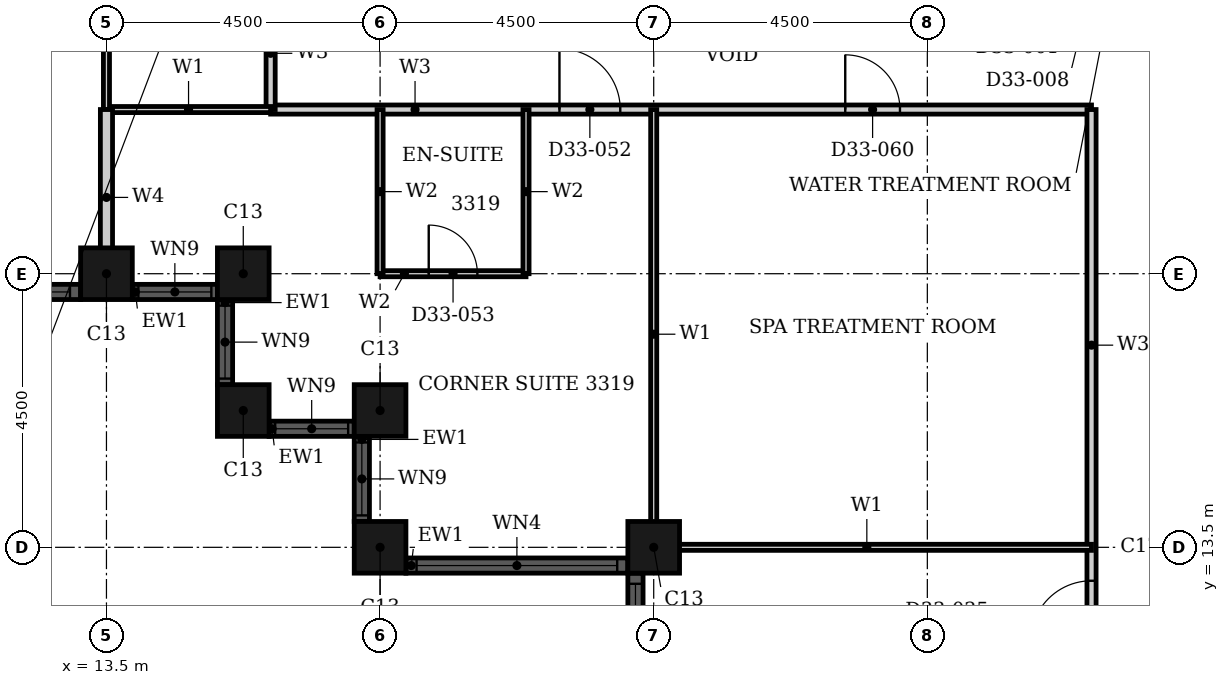
"""IFC4 building model, lengths in metres.
Left out: names, types, materials, properties, quantities, classifications, styles, units other than length and angle.
Written with IfcOpenShell. Run it as: python <this file> out.ifc"""

import sys

from ifc_helpers import new_model, si_unit, direction, frame, frame_2d, origin, origin_2d, place, context, subcontext, project, spatial, rectangle, hollow_rectangle, extrude, element, fill, save


model = new_model("IFC4")
c1 = context("Model", 3, precision=1e-05, world=origin(), true_north=direction((0.0, 1.0)))
c2 = subcontext(c1, "Body", "Model", "MODEL_VIEW")
j1 = project(units=[si_unit("LENGTHUNIT", "METRE"), si_unit("PLANEANGLEUNIT", "RADIAN")], contexts=[c1])
p1 = place(None, origin())
s1 = spatial("IfcSite", under=j1, at=p1, CompositionType="ELEMENT")
p2 = place(p1, origin())
s2 = spatial("IfcBuilding", under=s1, at=p2, CompositionType="ELEMENT")
p3 = place(p2, frame((0.0, 0.0, 133.2)))
s3 = spatial("IfcBuildingStorey", under=s2, at=p3, CompositionType="ELEMENT", Elevation=133.2)
for number, where, z_axis, x_axis in (
    (1, (13.5, 18.0, 0.0), (0.0, 0.0, 1.0), (1.0, 0.0, 0.0)),
    (2, (15.75, 18.0, 0.0), (0.0, 0.0, 1.0), (1.0, 0.0, 0.0)),
    (3, (15.75, 15.75, 0.0), (0.0, 0.0, 1.0), (1.0, 0.0, 0.0)),
    (4, (18.0, 15.75, 0.0), (0.0, 0.0, 1.0), (1.0, 0.0, 0.0)),
    (5, (18.0, 13.5, 0.0), (0.0, 0.0, 1.0), (1.0, 0.0, 0.0)),
    (6, (22.5, 13.5, 0.0), (0.0, 0.0, 1.0), (1.0, 0.0, 0.0)),
):
    element("IfcColumn", number, at=place(p3, frame(where, z_axis=z_axis, x_axis=x_axis)), inside=s3, PredefinedType="COLUMN", context=c2, shape_type="SweptSolid", body=[
        extrude(hollow_rectangle(XDim=0.85, YDim=0.85, WallThickness=0.026, at=origin_2d()), origin(), (0.0, 0.0, 1.0), 3.6),
    ])
p4 = place(p3, frame((4.925, 17.7, 0.0), z_axis=(0.0, 0.0, 1.0), x_axis=(1.0, 0.0, 0.0)))
e7 = element("IfcWall", 7, at=p4, inside=s3, PredefinedType="SOLIDWALL", context=c2, shape_type="SweptSolid", body=[
    extrude(rectangle(XDim=8.15, YDim=0.25, at=frame_2d((4.075, 0.0))), origin(), (0.0, 0.0, 1.0), 3.6),
])
p5 = place(p4, frame((0.175, 0.0, 0.9)))
e8 = element("IfcOpeningElement", 8, at=p5, cuts=e7, PredefinedType="OPENING", context=c2, shape_type="SweptSolid", body=[
    extrude(rectangle(XDim=3.3, YDim=2.08, at=frame_2d((1.65, 1.04))), frame((0.0, 0.135, 0.0), z_axis=(0.0, -1.0, 0.0), x_axis=(1.0, 0.0, 0.0)), (0.0, 0.0, 1.0), 0.27),
])
p6 = place(p4, frame((4.675, 0.0, 0.9)))
e9 = element("IfcOpeningElement", 9, at=p6, cuts=e7, PredefinedType="OPENING", context=c2, shape_type="SweptSolid", body=[
    extrude(rectangle(XDim=3.3, YDim=2.08, at=frame_2d((1.65, 1.04))), frame((0.0, 0.135, 0.0), z_axis=(0.0, -1.0, 0.0), x_axis=(1.0, 0.0, 0.0)), (0.0, 0.0, 1.0), 0.27),
])
p7 = place(p3, frame((13.925, 17.7, 0.0), z_axis=(0.0, 0.0, 1.0), x_axis=(1.0, 0.0, 0.0)))
e10 = element("IfcWall", 10, at=p7, inside=s3, PredefinedType="SOLIDWALL", context=c2, shape_type="SweptSolid", body=[
    extrude(rectangle(XDim=1.4, YDim=0.25, at=frame_2d((0.7, 0.0))), origin(), (0.0, 0.0, 1.0), 3.6),
])
p8 = place(p7, frame((0.1, 0.0, 0.9)))
e11 = element("IfcOpeningElement", 11, at=p8, cuts=e10, PredefinedType="OPENING", context=c2, shape_type="SweptSolid", body=[
    extrude(rectangle(XDim=1.2, YDim=2.08, at=frame_2d((0.6, 1.04))), frame((0.0, 0.135, 0.0), z_axis=(0.0, -1.0, 0.0), x_axis=(1.0, 0.0, 0.0)), (0.0, 0.0, 1.0), 0.27),
])
p9 = place(p3, frame((15.45, 17.575, 0.0), z_axis=(0.0, 0.0, 1.0), x_axis=(0.0, -1.0, 0.0)))
e12 = element("IfcWall", 12, at=p9, inside=s3, PredefinedType="SOLIDWALL", context=c2, shape_type="SweptSolid", body=[
    extrude(rectangle(XDim=1.4, YDim=0.25, at=frame_2d((0.7, 0.0))), origin(), (0.0, 0.0, 1.0), 3.6),
])
p10 = place(p9, frame((0.1, 0.0, 0.9)))
e13 = element("IfcOpeningElement", 13, at=p10, cuts=e12, PredefinedType="OPENING", context=c2, shape_type="SweptSolid", body=[
    extrude(rectangle(XDim=1.2, YDim=2.08, at=frame_2d((0.6, 1.04))), frame((0.0, 0.135, 0.0), z_axis=(0.0, -1.0, 0.0), x_axis=(1.0, 0.0, 0.0)), (0.0, 0.0, 1.0), 0.27),
])
p11 = place(p3, frame((16.175, 15.45, 0.0), z_axis=(0.0, 0.0, 1.0), x_axis=(1.0, 0.0, 0.0)))
e14 = element("IfcWall", 14, at=p11, inside=s3, PredefinedType="SOLIDWALL", context=c2, shape_type="SweptSolid", body=[
    extrude(rectangle(XDim=1.4, YDim=0.25, at=frame_2d((0.7, 0.0))), origin(), (0.0, 0.0, 1.0), 3.6),
])
p12 = place(p11, frame((0.1, 0.0, 0.9)))
e15 = element("IfcOpeningElement", 15, at=p12, cuts=e14, PredefinedType="OPENING", context=c2, shape_type="SweptSolid", body=[
    extrude(rectangle(XDim=1.2, YDim=2.08, at=frame_2d((0.6, 1.04))), frame((0.0, 0.135, 0.0), z_axis=(0.0, -1.0, 0.0), x_axis=(1.0, 0.0, 0.0)), (0.0, 0.0, 1.0), 0.27),
])
p13 = place(p3, frame((17.7, 15.325, 0.0), z_axis=(0.0, 0.0, 1.0), x_axis=(0.0, -1.0, 0.0)))
e16 = element("IfcWall", 16, at=p13, inside=s3, PredefinedType="SOLIDWALL", context=c2, shape_type="SweptSolid", body=[
    extrude(rectangle(XDim=1.4, YDim=0.25, at=frame_2d((0.7, 0.0))), origin(), (0.0, 0.0, 1.0), 3.6),
])
p14 = place(p13, frame((0.1, 0.0, 0.9)))
e17 = element("IfcOpeningElement", 17, at=p14, cuts=e16, PredefinedType="OPENING", context=c2, shape_type="SweptSolid", body=[
    extrude(rectangle(XDim=1.2, YDim=2.08, at=frame_2d((0.6, 1.04))), frame((0.0, 0.135, 0.0), z_axis=(0.0, -1.0, 0.0), x_axis=(1.0, 0.0, 0.0)), (0.0, 0.0, 1.0), 0.27),
])
p15 = place(p3, frame((18.425, 13.2, 0.0), z_axis=(0.0, 0.0, 1.0), x_axis=(1.0, 0.0, 0.0)))
e18 = element("IfcWall", 18, at=p15, inside=s3, PredefinedType="SOLIDWALL", context=c2, shape_type="SweptSolid", body=[
    extrude(rectangle(XDim=3.65, YDim=0.25, at=frame_2d((1.825, 0.0))), origin(), (0.0, 0.0, 1.0), 3.6),
])
p16 = place(p15, frame((0.175, 0.0, 0.9)))
e19 = element("IfcOpeningElement", 19, at=p16, cuts=e18, PredefinedType="OPENING", context=c2, shape_type="SweptSolid", body=[
    extrude(rectangle(XDim=3.3, YDim=2.08, at=frame_2d((1.65, 1.04))), frame((0.0, 0.135, 0.0), z_axis=(0.0, -1.0, 0.0), x_axis=(1.0, 0.0, 0.0)), (0.0, 0.0, 1.0), 0.27),
])
p17 = place(p3, frame((22.2, 13.075, 0.0), z_axis=(0.0, 0.0, 1.0), x_axis=(0.0, -1.0, 0.0)))
e20 = element("IfcWall", 20, at=p17, inside=s3, PredefinedType="SOLIDWALL", context=c2, shape_type="SweptSolid", body=[
    extrude(rectangle(XDim=8.15, YDim=0.25, at=frame_2d((4.075, 0.0))), origin(), (0.0, 0.0, 1.0), 3.6),
])
p18 = place(p17, frame((0.175, 0.0, 0.9)))
e21 = element("IfcOpeningElement", 21, at=p18, cuts=e20, PredefinedType="OPENING", context=c2, shape_type="SweptSolid", body=[
    extrude(rectangle(XDim=3.3, YDim=2.08, at=frame_2d((1.65, 1.04))), frame((0.0, 0.135, 0.0), z_axis=(0.0, -1.0, 0.0), x_axis=(1.0, 0.0, 0.0)), (0.0, 0.0, 1.0), 0.27),
])
p19 = place(p17, frame((4.675, 0.0, 0.9)))
e22 = element("IfcOpeningElement", 22, at=p19, cuts=e20, PredefinedType="OPENING", context=c2, shape_type="SweptSolid", body=[
    extrude(rectangle(XDim=3.3, YDim=2.08, at=frame_2d((1.65, 1.04))), frame((0.0, 0.135, 0.0), z_axis=(0.0, -1.0, 0.0), x_axis=(1.0, 0.0, 0.0)), (0.0, 0.0, 1.0), 0.27),
])
p20 = place(p3, frame((16.2, 20.7, 0.0), z_axis=(0.0, 0.0, 1.0), x_axis=(1.0, 0.0, 0.0)))
e23 = element("IfcWall", 23, at=p20, inside=s3, PredefinedType="PARTITIONING", context=c2, shape_type="SweptSolid", body=[
    extrude(rectangle(XDim=13.5, YDim=0.15, at=frame_2d((6.75, 0.0))), origin(), (0.0, 0.0, 1.0), 3.3),
])
p21 = place(p20, frame((4.75, 0.0, 0.0)))
e24 = element("IfcOpeningElement", 24, at=p21, cuts=e23, PredefinedType="OPENING", context=c2, shape_type="SweptSolid", body=[
    extrude(rectangle(XDim=1.0, YDim=2.1, at=frame_2d((0.5, 1.05))), frame((0.0, 0.085, 0.0), z_axis=(0.0, -1.0, 0.0), x_axis=(1.0, 0.0, 0.0)), (0.0, 0.0, 1.0), 0.17),
])
p22 = place(p20, frame((9.45, 0.0, 0.0)))
e25 = element("IfcOpeningElement", 25, at=p22, cuts=e23, PredefinedType="OPENING", context=c2, shape_type="SweptSolid", body=[
    extrude(rectangle(XDim=0.9, YDim=2.1, at=frame_2d((0.45, 1.05))), frame((0.0, 0.085, 0.0), z_axis=(0.0, -1.0, 0.0), x_axis=(1.0, 0.0, 0.0)), (0.0, 0.0, 1.0), 0.17),
])
p23 = place(p3, frame((16.2, 20.7, 0.0), z_axis=(0.0, 0.0, 1.0), x_axis=(0.0, 1.0, 0.0)))
e26 = element("IfcWall", 26, at=p23, inside=s3, PredefinedType="PARTITIONING", context=c2, shape_type="SweptSolid", body=[
    extrude(rectangle(XDim=4.5, YDim=0.15, at=frame_2d((2.25, 0.0))), origin(), (0.0, 0.0, 1.0), 3.3),
])
p24 = place(p23, frame((1.85, 0.0, 0.0)))
e27 = element("IfcOpeningElement", 27, at=p24, cuts=e26, PredefinedType="OPENING", context=c2, shape_type="SweptSolid", body=[
    extrude(rectangle(XDim=0.9, YDim=2.1, at=frame_2d((0.45, 1.05))), frame((0.0, 0.085, 0.0), z_axis=(0.0, -1.0, 0.0), x_axis=(1.0, 0.0, 0.0)), (0.0, 0.0, 1.0), 0.17),
])
p25 = place(p3, frame((29.7, 4.5, 0.0), z_axis=(0.0, 0.0, 1.0), x_axis=(0.0, 1.0, 0.0)))
e28 = element("IfcWall", 28, at=p25, inside=s3, PredefinedType="PARTITIONING", context=c2, shape_type="SweptSolid", body=[
    extrude(rectangle(XDim=16.2, YDim=0.15, at=frame_2d((8.1, 0.0))), origin(), (0.0, 0.0, 1.0), 3.3),
])
p26 = place(p25, frame((7.45, 0.0, 0.0)))
e29 = element("IfcOpeningElement", 29, at=p26, cuts=e28, PredefinedType="OPENING", context=c2, shape_type="SweptSolid", body=[
    extrude(rectangle(XDim=1.0, YDim=2.1, at=frame_2d((0.5, 1.05))), frame((0.0, 0.085, 0.0), z_axis=(0.0, -1.0, 0.0), x_axis=(1.0, 0.0, 0.0)), (0.0, 0.0, 1.0), 0.17),
])
p27 = place(p25, frame((2.95, 0.0, 0.0)))
e30 = element("IfcOpeningElement", 30, at=p27, cuts=e28, PredefinedType="OPENING", context=c2, shape_type="SweptSolid", body=[
    extrude(rectangle(XDim=1.0, YDim=2.1, at=frame_2d((0.5, 1.05))), frame((0.0, 0.085, 0.0), z_axis=(0.0, -1.0, 0.0), x_axis=(1.0, 0.0, 0.0)), (0.0, 0.0, 1.0), 0.17),
])
p28 = place(p3, frame((22.31, 13.5, 0.0), z_axis=(0.0, 0.0, 1.0), x_axis=(1.0, 0.0, 0.0)))
e31 = element("IfcWall", 31, at=p28, inside=s3, PredefinedType="PARTITIONING", context=c2, shape_type="SweptSolid", body=[
    extrude(rectangle(XDim=7.39, YDim=0.1, at=frame_2d((3.695, 0.0))), origin(), (0.0, 0.0, 1.0), 2.38),
])
p29 = place(p3, frame((13.5, 20.7, 0.0), z_axis=(0.0, 0.0, 1.0), x_axis=(1.0, 0.0, 0.0)))
e32 = element("IfcWall", 32, at=p29, inside=s3, PredefinedType="PARTITIONING", context=c2, shape_type="SweptSolid", body=[
    extrude(rectangle(XDim=2.7, YDim=0.1, at=frame_2d((1.35, 0.0))), origin(), (0.0, 0.0, 1.0), 3.3),
])
p30 = place(p3, frame((13.5, 20.7, 0.0), z_axis=(0.0, 0.0, 1.0), x_axis=(0.0, 1.0, 0.0)))
e33 = element("IfcWall", 33, at=p30, inside=s3, PredefinedType="PARTITIONING", context=c2, shape_type="SweptSolid", body=[
    extrude(rectangle(XDim=4.5, YDim=0.1, at=frame_2d((2.25, 0.0))), origin(), (0.0, 0.0, 1.0), 2.38),
])
p31 = place(p3, frame((22.5, 13.31, 0.0), z_axis=(0.0, 0.0, 1.0), x_axis=(0.0, 1.0, 0.0)))
e34 = element("IfcWall", 34, at=p31, inside=s3, PredefinedType="PARTITIONING", context=c2, shape_type="SweptSolid", body=[
    extrude(rectangle(XDim=7.39, YDim=0.1, at=frame_2d((3.695, 0.0))), origin(), (0.0, 0.0, 1.0), 3.3),
])
p32 = place(p3, frame((13.5, 17.81, 0.0), z_axis=(0.0, 0.0, 1.0), x_axis=(0.0, 1.0, 0.0)))
e35 = element("IfcWall", 35, at=p32, inside=s3, PredefinedType="PARTITIONING", context=c2, shape_type="SweptSolid", body=[
    extrude(rectangle(XDim=2.89, YDim=0.2, at=frame_2d((1.445, 0.0))), origin(), (0.0, 0.0, 1.0), 2.38),
])
p33 = place(p3, frame((18.0, 18.0, 0.0), z_axis=(0.0, 0.0, 1.0), x_axis=(1.0, 0.0, 0.0)))
e36 = element("IfcWall", 36, at=p33, inside=s3, PredefinedType="PARTITIONING", context=c2, shape_type="SweptSolid", body=[
    extrude(rectangle(XDim=2.4, YDim=0.1, at=frame_2d((1.2, 0.0))), origin(), (0.0, 0.0, 1.0), 3.3),
])
p34 = place(p33, frame((0.8, 0.0, 0.0)))
e37 = element("IfcOpeningElement", 37, at=p34, cuts=e36, PredefinedType="OPENING", context=c2, shape_type="SweptSolid", body=[
    extrude(rectangle(XDim=0.8, YDim=2.1, at=frame_2d((0.4, 1.05))), frame((0.0, 0.06, 0.0), z_axis=(0.0, -1.0, 0.0), x_axis=(1.0, 0.0, 0.0)), (0.0, 0.0, 1.0), 0.12),
])
for number, where, z_axis, x_axis in (
    (38, (18.0, 18.0, 0.0), (0.0, 0.0, 1.0), (0.0, 1.0, 0.0)),
    (39, (20.4, 18.0, 0.0), (0.0, 0.0, 1.0), (0.0, 1.0, 0.0)),
):
    element("IfcWall", number, at=place(p3, frame(where, z_axis=z_axis, x_axis=x_axis)), inside=s3, PredefinedType="PARTITIONING", context=c2, shape_type="SweptSolid", body=[
        extrude(rectangle(XDim=2.7, YDim=0.1, at=frame_2d((1.35, 0.0))), origin(), (0.0, 0.0, 1.0), 3.3),
    ])
p35 = place(p6, origin())
e40 = element("IfcWindow", 40, at=p35, inside=s3, PartitioningType="SINGLE_PANEL", PredefinedType="WINDOW", context=c2, shape_type="SweptSolid", body=[
    extrude(rectangle(XDim=3.3, YDim=2.08, at=frame_2d((1.65, 1.04))), frame((0.0, 0.03, 0.0), z_axis=(0.0, -1.0, 0.0), x_axis=(1.0, 0.0, 0.0)), (0.0, 0.0, 1.0), 0.06),
])
fill(e9, e40)
p36 = place(p8, origin())
e41 = element("IfcWindow", 41, at=p36, inside=s3, PartitioningType="SINGLE_PANEL", PredefinedType="WINDOW", context=c2, shape_type="SweptSolid", body=[
    extrude(rectangle(XDim=1.2, YDim=2.08, at=frame_2d((0.6, 1.04))), frame((0.0, 0.03, 0.0), z_axis=(0.0, -1.0, 0.0), x_axis=(1.0, 0.0, 0.0)), (0.0, 0.0, 1.0), 0.06),
])
fill(e11, e41)
p37 = place(p10, origin())
e42 = element("IfcWindow", 42, at=p37, inside=s3, PartitioningType="SINGLE_PANEL", PredefinedType="WINDOW", context=c2, shape_type="SweptSolid", body=[
    extrude(rectangle(XDim=1.2, YDim=2.08, at=frame_2d((0.6, 1.04))), frame((0.0, 0.03, 0.0), z_axis=(0.0, -1.0, 0.0), x_axis=(1.0, 0.0, 0.0)), (0.0, 0.0, 1.0), 0.06),
])
fill(e13, e42)
p38 = place(p12, origin())
e43 = element("IfcWindow", 43, at=p38, inside=s3, PartitioningType="SINGLE_PANEL", PredefinedType="WINDOW", context=c2, shape_type="SweptSolid", body=[
    extrude(rectangle(XDim=1.2, YDim=2.08, at=frame_2d((0.6, 1.04))), frame((0.0, 0.03, 0.0), z_axis=(0.0, -1.0, 0.0), x_axis=(1.0, 0.0, 0.0)), (0.0, 0.0, 1.0), 0.06),
])
fill(e15, e43)
p39 = place(p14, origin())
e44 = element("IfcWindow", 44, at=p39, inside=s3, PartitioningType="SINGLE_PANEL", PredefinedType="WINDOW", context=c2, shape_type="SweptSolid", body=[
    extrude(rectangle(XDim=1.2, YDim=2.08, at=frame_2d((0.6, 1.04))), frame((0.0, 0.03, 0.0), z_axis=(0.0, -1.0, 0.0), x_axis=(1.0, 0.0, 0.0)), (0.0, 0.0, 1.0), 0.06),
])
fill(e17, e44)
p40 = place(p16, origin())
e45 = element("IfcWindow", 45, at=p40, inside=s3, PartitioningType="SINGLE_PANEL", PredefinedType="WINDOW", context=c2, shape_type="SweptSolid", body=[
    extrude(rectangle(XDim=3.3, YDim=2.08, at=frame_2d((1.65, 1.04))), frame((0.0, 0.03, 0.0), z_axis=(0.0, -1.0, 0.0), x_axis=(1.0, 0.0, 0.0)), (0.0, 0.0, 1.0), 0.06),
])
fill(e19, e45)
p41 = place(p18, origin())
e46 = element("IfcWindow", 46, at=p41, inside=s3, PartitioningType="SINGLE_PANEL", PredefinedType="WINDOW", context=c2, shape_type="SweptSolid", body=[
    extrude(rectangle(XDim=3.3, YDim=2.08, at=frame_2d((1.65, 1.04))), frame((0.0, 0.03, 0.0), z_axis=(0.0, -1.0, 0.0), x_axis=(1.0, 0.0, 0.0)), (0.0, 0.0, 1.0), 0.06),
])
fill(e21, e46)
p42 = place(p26, origin())
e47 = element("IfcDoor", 47, at=p42, inside=s3, OperationType="SINGLE_SWING_RIGHT", PredefinedType="DOOR", context=c2, shape_type="SweptSolid", body=[
    extrude(rectangle(XDim=1.0, YDim=2.1, at=frame_2d((0.5, 1.05))), frame((0.0, 0.025, 0.0), z_axis=(0.0, -1.0, 0.0), x_axis=(1.0, 0.0, 0.0)), (0.0, 0.0, 1.0), 0.05),
])
fill(e29, e47)
p43 = place(p21, origin())
e48 = element("IfcDoor", 48, at=p43, inside=s3, OperationType="SINGLE_SWING_RIGHT", PredefinedType="DOOR", context=c2, shape_type="SweptSolid", body=[
    extrude(rectangle(XDim=1.0, YDim=2.1, at=frame_2d((0.5, 1.05))), frame((0.0, 0.025, 0.0), z_axis=(0.0, -1.0, 0.0), x_axis=(1.0, 0.0, 0.0)), (0.0, 0.0, 1.0), 0.05),
])
fill(e24, e48)
p44 = place(p34, origin())
e49 = element("IfcDoor", 49, at=p44, inside=s3, OperationType="SINGLE_SWING_LEFT", PredefinedType="DOOR", context=c2, shape_type="SweptSolid", body=[
    extrude(rectangle(XDim=0.8, YDim=2.1, at=frame_2d((0.4, 1.05))), frame((0.0, 0.025, 0.0), z_axis=(0.0, -1.0, 0.0), x_axis=(1.0, 0.0, 0.0)), (0.0, 0.0, 1.0), 0.05),
])
fill(e37, e49)
p45 = place(p22, origin())
e50 = element("IfcDoor", 50, at=p45, inside=s3, OperationType="SINGLE_SWING_LEFT", PredefinedType="DOOR", context=c2, shape_type="SweptSolid", body=[
    extrude(rectangle(XDim=0.9, YDim=2.1, at=frame_2d((0.45, 1.05))), frame((0.0, 0.025, 0.0), z_axis=(0.0, -1.0, 0.0), x_axis=(1.0, 0.0, 0.0)), (0.0, 0.0, 1.0), 0.05),
])
fill(e25, e50)
save(model, sys.argv[1])
